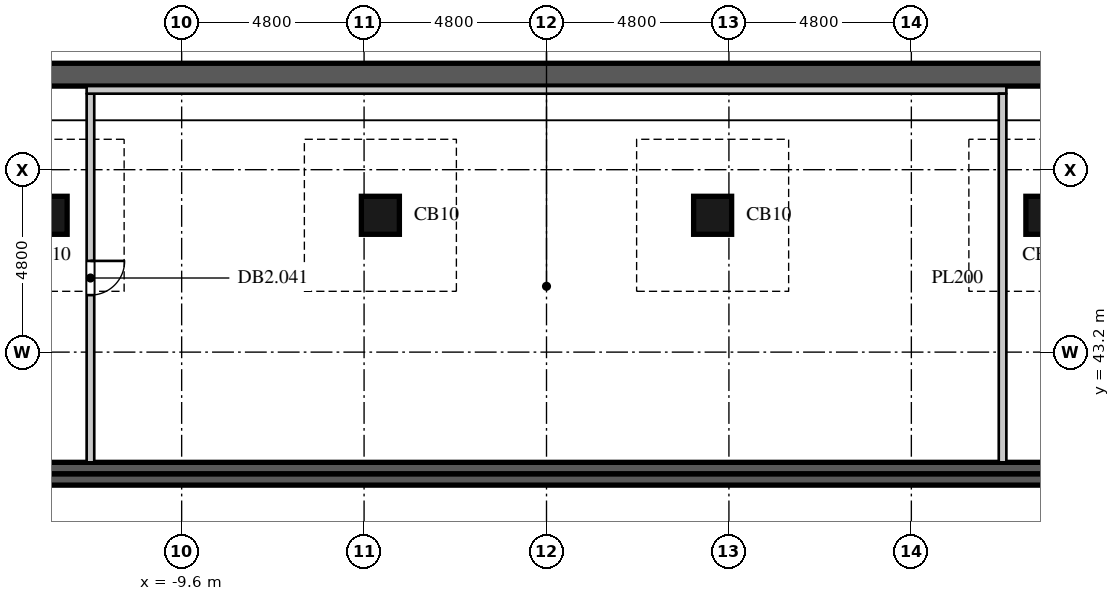
"""IFC4 building model, lengths in metres.
Left out: names, types, materials, properties, quantities, classifications, styles, units other than length and angle.
Written with IfcOpenShell. Run it as: python <this file> out.ifc"""

import sys

from ifc_helpers import new_model, si_unit, direction, frame, frame_2d, origin, origin_2d, place, context, subcontext, project, spatial, polyline, rectangle, outline, extrude, element, fill, save


model = new_model("IFC4")
c1 = context("Model", 3, precision=1e-05, world=origin(), true_north=direction((0.0, 1.0)))
c2 = subcontext(c1, "Body", "Model", "MODEL_VIEW")
j1 = project(units=[si_unit("LENGTHUNIT", "METRE"), si_unit("PLANEANGLEUNIT", "RADIAN")], contexts=[c1])
p1 = place(None, origin())
s1 = spatial("IfcSite", under=j1, at=p1, CompositionType="ELEMENT")
p2 = place(p1, origin())
s2 = spatial("IfcBuilding", under=s1, at=p2, CompositionType="ELEMENT")
p3 = place(p2, frame((0.0, 0.0, -9.0)))
s3 = spatial("IfcBuildingStorey", under=s2, at=p3, CompositionType="ELEMENT", Elevation=-9.0)
p4 = place(p3, origin())
e1 = element("IfcWall", 1, at=p4, inside=s3, PredefinedType="SOLIDWALL", context=c2, shape_type="SweptSolid", body=[
    extrude(outline(polyline([(23.513, 50.8), (-23.513, 50.8), (-23.264, 50.2), (23.264, 50.2), (23.513, 50.8)])), origin(), (0.0, 0.0, 1.0), 4.5),
])
for number, where, z_axis, x_axis in (
    (2, (-13.114, 46.8, 0.0), (0.0, 0.0, 1.0), (1.0, 0.0, 0.0)),
    (3, (-4.371, 46.8, 0.0), (0.0, 0.0, 1.0), (1.0, 0.0, 0.0)),
    (4, (4.371, 46.8, 0.0), (0.0, 0.0, 1.0), (1.0, 0.0, 0.0)),
    (5, (13.114, 46.8, 0.0), (0.0, 0.0, 1.0), (1.0, 0.0, 0.0)),
):
    element("IfcColumn", number, at=place(p3, frame(where, z_axis=z_axis, x_axis=x_axis)), inside=s3, PredefinedType="COLUMN", context=c2, shape_type="SweptSolid", body=[
        extrude(rectangle(XDim=1.0, YDim=1.0, at=origin_2d()), origin(), (0.0, 0.0, 1.0), 4.5),
    ])
p5 = place(p3, frame((-19.6, 40.15, 0.0), z_axis=(0.0, 0.0, 1.0), x_axis=(1.0, 0.0, 0.0)))
e6 = element("IfcWall", 6, at=p5, inside=s3, PredefinedType="SOLIDWALL", context=c2, shape_type="SweptSolid", body=[
    extrude(rectangle(XDim=39.2, YDim=0.3, at=frame_2d((19.6, 0.0))), origin(), (0.0, 0.0, 1.0), 4.5),
])
p6 = place(p3, frame((19.6, 39.85, 0.0), z_axis=(0.0, 0.0, 1.0), x_axis=(-1.0, 0.0, 0.0)))
e7 = element("IfcWall", 7, at=p6, inside=s3, PredefinedType="SOLIDWALL", context=c2, shape_type="SweptSolid", body=[
    extrude(outline(polyline([(0.0, 0.0), (34.2, 0.0), (34.2, 0.125), (3.2, 4.0), (0.0, 4.2), (0.0, 0.0)])), frame((0.0, 0.15, 0.0), z_axis=(0.0, -1.0, 0.0), x_axis=(1.0, 0.0, 0.0)), (0.0, 0.0, 1.0), 0.3),
])
p7 = place(p3, frame((-12.0, 40.3, 0.0), z_axis=(0.0, 0.0, 1.0), x_axis=(0.0, 1.0, 0.0)))
e8 = element("IfcWall", 8, at=p7, inside=s3, PredefinedType="PARTITIONING", context=c2, shape_type="SweptSolid", body=[
    extrude(rectangle(XDim=9.7, YDim=0.2, at=frame_2d((4.85, 0.0))), origin(), (0.0, 0.0, 1.0), 4.048),
])
p8 = place(p7, frame((4.4, 0.0, 0.0)))
e9 = element("IfcOpeningElement", 9, at=p8, cuts=e8, PredefinedType="OPENING", context=c2, shape_type="SweptSolid", body=[
    extrude(rectangle(XDim=0.9, YDim=2.2, at=frame_2d((0.45, 1.1))), frame((0.0, 0.11, 0.0), z_axis=(0.0, -1.0, 0.0), x_axis=(1.0, 0.0, 0.0)), (0.0, 0.0, 1.0), 0.22),
])
p9 = place(p3, frame((-12.1, 50.1, 0.0), z_axis=(0.0, 0.0, 1.0), x_axis=(1.0, 0.0, 0.0)))
e10 = element("IfcWall", 10, at=p9, inside=s3, PredefinedType="PARTITIONING", context=c2, shape_type="SweptSolid", body=[
    extrude(rectangle(XDim=24.2, YDim=0.2, at=frame_2d((12.1, 0.0))), origin(), (0.0, 0.0, 1.0), 4.048),
])
p10 = place(p3, frame((12.0, 40.3, 0.0), z_axis=(0.0, 0.0, 1.0), x_axis=(0.0, 1.0, 0.0)))
e11 = element("IfcWall", 11, at=p10, inside=s3, PredefinedType="PARTITIONING", context=c2, shape_type="SweptSolid", body=[
    extrude(rectangle(XDim=9.7, YDim=0.2, at=frame_2d((4.85, 0.0))), origin(), (0.0, 0.0, 1.0), 4.048),
])
p11 = place(p8, origin())
e12 = element("IfcDoor", 12, at=p11, inside=s3, OperationType="SINGLE_SWING_LEFT", PredefinedType="DOOR", context=c2, shape_type="SweptSolid", body=[
    extrude(rectangle(XDim=0.9, YDim=2.2, at=frame_2d((0.45, 1.1))), frame((0.0, 0.025, 0.0), z_axis=(0.0, -1.0, 0.0), x_axis=(1.0, 0.0, 0.0)), (0.0, 0.0, 1.0), 0.05),
])
fill(e9, e12)
save(model, sys.argv[1])
